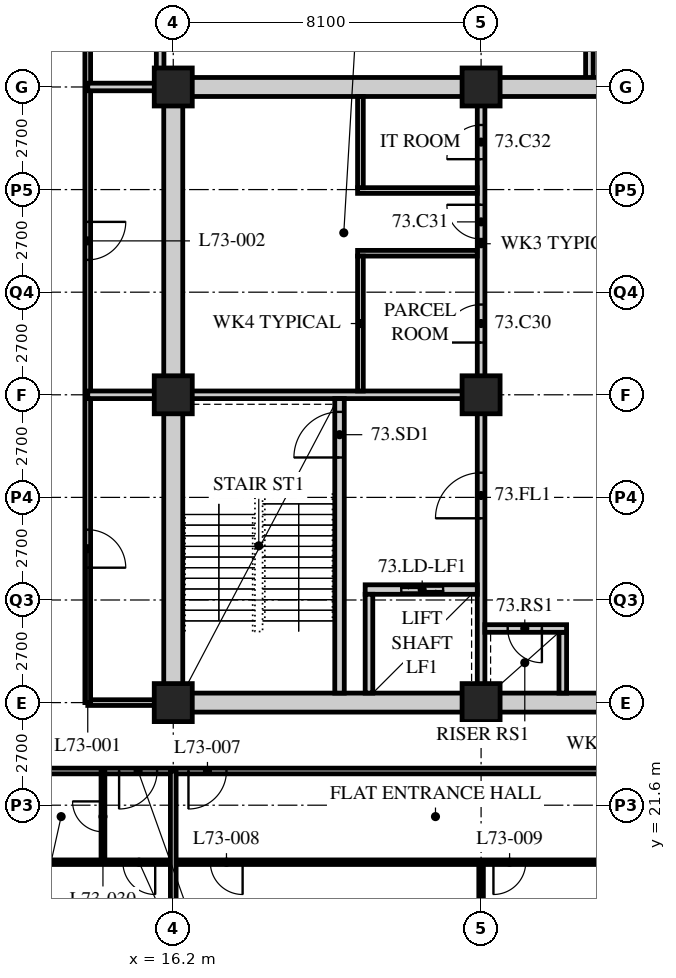
"""IFC4 building model, lengths in metres.
Left out: names, types, materials, properties, quantities, classifications, styles, units other than length and angle.
Written with IfcOpenShell. Run it as: python <this file> out.ifc"""

import sys

from ifc_helpers import new_model, si_unit, direction, frame, frame_2d, origin, origin_2d, place, context, subcontext, project, spatial, rectangle, hollow_rectangle, extrude, element, fill, save


model = new_model("IFC4")
c1 = context("Model", 3, precision=1e-05, world=origin(), true_north=direction((0.0, 1.0)))
c2 = subcontext(c1, "Body", "Model", "MODEL_VIEW")
j1 = project(units=[si_unit("LENGTHUNIT", "METRE"), si_unit("PLANEANGLEUNIT", "RADIAN")], contexts=[c1])
p1 = place(None, origin())
s1 = spatial("IfcSite", under=j1, at=p1, CompositionType="ELEMENT")
p2 = place(p1, origin())
s2 = spatial("IfcBuilding", under=s1, at=p2, CompositionType="ELEMENT")
p3 = place(p2, frame((0.0, 0.0, 285.3)))
s3 = spatial("IfcBuildingStorey", under=s2, at=p3, CompositionType="ELEMENT", Elevation=285.3)
for number, where, z_axis, x_axis in (
    (1, (16.2, 24.3, 0.0), (0.0, 0.0, 1.0), (1.0, 0.0, 0.0)),
    (2, (16.2, 32.4, 0.0), (0.0, 0.0, 1.0), (1.0, 0.0, 0.0)),
    (3, (16.2, 40.5, 0.0), (0.0, 0.0, 1.0), (1.0, 0.0, 0.0)),
    (4, (24.3, 24.3, 0.0), (0.0, 0.0, 1.0), (1.0, 0.0, 0.0)),
    (5, (24.3, 32.4, 0.0), (0.0, 0.0, 1.0), (1.0, 0.0, 0.0)),
    (6, (24.3, 40.5, 0.0), (0.0, 0.0, 1.0), (1.0, 0.0, 0.0)),
):
    element("IfcColumn", number, at=place(p3, frame(where, z_axis=z_axis, x_axis=x_axis)), inside=s3, PredefinedType="COLUMN", context=c2, shape_type="SweptSolid", body=[
        extrude(hollow_rectangle(XDim=1.0, YDim=1.0, WallThickness=0.1, at=origin_2d()), origin(), (0.0, 0.0, 1.0), 3.9),
    ])
p4 = place(p3, frame((12.15, 22.5, 0.0), z_axis=(0.0, 0.0, 1.0), x_axis=(1.0, 0.0, 0.0)))
e7 = element("IfcWall", 7, at=p4, inside=s3, PredefinedType="PARTITIONING", context=c2, shape_type="SweptSolid", body=[
    extrude(rectangle(XDim=24.3, YDim=0.15, at=frame_2d((12.15, 0.0))), origin(), (0.0, 0.0, 1.0), 3.69),
])
p5 = place(p4, frame((4.45, 0.0, 0.0)))
e8 = element("IfcOpeningElement", 8, at=p5, cuts=e7, PredefinedType="OPENING", context=c2, shape_type="SweptSolid", body=[
    extrude(rectangle(XDim=1.0, YDim=2.1, at=frame_2d((0.5, 1.05))), frame((0.0, 0.085, 0.0), z_axis=(0.0, -1.0, 0.0), x_axis=(1.0, 0.0, 0.0)), (0.0, 0.0, 1.0), 0.17),
])
p6 = place(p4, frame((22.6, 0.0, 0.0)))
e9 = element("IfcOpeningElement", 9, at=p6, cuts=e7, PredefinedType="OPENING", context=c2, shape_type="SweptSolid", body=[
    extrude(rectangle(XDim=1.0, YDim=2.1, at=frame_2d((0.5, 1.05))), frame((0.0, 0.085, 0.0), z_axis=(0.0, -1.0, 0.0), x_axis=(1.0, 0.0, 0.0)), (0.0, 0.0, 1.0), 0.17),
])
p7 = place(p4, frame((2.625, 0.0, 0.0)))
e10 = element("IfcOpeningElement", 10, at=p7, cuts=e7, PredefinedType="OPENING", context=c2, shape_type="SweptSolid", body=[
    extrude(rectangle(XDim=1.0, YDim=2.1, at=frame_2d((0.5, 1.05))), frame((0.0, 0.085, 0.0), z_axis=(0.0, -1.0, 0.0), x_axis=(1.0, 0.0, 0.0)), (0.0, 0.0, 1.0), 0.17),
])
p8 = place(p3, frame((16.0, 24.3, 0.0), z_axis=(0.0, 0.0, 1.0), x_axis=(-1.0, 0.0, 0.0)))
e11 = element("IfcWall", 11, at=p8, inside=s3, PredefinedType="PARTITIONING", context=c2, shape_type="SweptSolid", body=[
    extrude(rectangle(XDim=2.05, YDim=0.15, at=frame_2d((1.025, 0.0))), origin(), (0.0, 0.0, 1.0), 3.078),
])
p9 = place(p3, frame((13.95, 24.3, 0.0), z_axis=(0.0, 0.0, 1.0), x_axis=(0.0, 1.0, 0.0)))
e12 = element("IfcWall", 12, at=p9, inside=s3, PredefinedType="PARTITIONING", context=c2, shape_type="SweptSolid", body=[
    extrude(rectangle(XDim=22.5, YDim=0.15, at=frame_2d((11.25, 0.0))), origin(), (0.0, 0.0, 1.0), 3.69),
])
p10 = place(p9, frame((3.55, 0.0, 0.0)))
e13 = element("IfcOpeningElement", 13, at=p10, cuts=e12, PredefinedType="OPENING", context=c2, shape_type="SweptSolid", body=[
    extrude(rectangle(XDim=1.0, YDim=2.1, at=frame_2d((0.5, 1.05))), frame((0.0, 0.085, 0.0), z_axis=(0.0, -1.0, 0.0), x_axis=(1.0, 0.0, 0.0)), (0.0, 0.0, 1.0), 0.17),
])
p11 = place(p9, frame((11.65, 0.0, 0.0)))
e14 = element("IfcOpeningElement", 14, at=p11, cuts=e12, PredefinedType="OPENING", context=c2, shape_type="SweptSolid", body=[
    extrude(rectangle(XDim=1.0, YDim=2.1, at=frame_2d((0.5, 1.05))), frame((0.0, 0.085, 0.0), z_axis=(0.0, -1.0, 0.0), x_axis=(1.0, 0.0, 0.0)), (0.0, 0.0, 1.0), 0.17),
])
p12 = place(p3, frame((13.95, 32.4, 0.0), z_axis=(0.0, 0.0, 1.0), x_axis=(1.0, 0.0, 0.0)))
e15 = element("IfcWall", 15, at=p12, inside=s3, PredefinedType="SOLIDWALL", context=c2, shape_type="SweptSolid", body=[
    extrude(rectangle(XDim=2.25, YDim=0.2, at=frame_2d((1.125, 0.0))), origin(), (0.0, 0.0, 1.0), 3.078),
])
for number, where, z_axis, x_axis in (
    (16, (15.855, 46.8, 0.0), (0.0, 0.0, 1.0), (0.0, -1.0, 0.0)),
    (17, (27.15, 40.5, 0.0), (0.0, 0.0, 1.0), (0.0, 1.0, 0.0)),
):
    element("IfcWall", number, at=place(p3, frame(where, z_axis=z_axis, x_axis=x_axis)), inside=s3, PredefinedType="SOLIDWALL", context=c2, shape_type="SweptSolid", body=[
        extrude(rectangle(XDim=6.3, YDim=0.2, at=frame_2d((3.15, 0.0))), origin(), (0.0, 0.0, 1.0), 3.69),
    ])
p13 = place(p3, frame((13.95, 40.5, 0.0), z_axis=(0.0, 0.0, 1.0), x_axis=(1.0, 0.0, 0.0)))
e18 = element("IfcWall", 18, at=p13, inside=s3, PredefinedType="SOLIDWALL", context=c2, shape_type="SweptSolid", body=[
    extrude(rectangle(XDim=2.25, YDim=0.2, at=frame_2d((1.125, 0.0))), origin(), (0.0, 0.0, 1.0), 3.078),
])
p14 = place(p3, frame((24.3, 20.1, 0.0), z_axis=(0.0, 0.0, 1.0), x_axis=(0.0, -1.0, 0.0)))
e19 = element("IfcWall", 19, at=p14, inside=s3, PredefinedType="PARTITIONING", context=c2, shape_type="SweptSolid", body=[
    extrude(rectangle(XDim=3.6, YDim=0.12, at=frame_2d((1.8, 0.0))), origin(), (0.0, 0.0, 1.0), 3.078),
])
p15 = place(p3, frame((12.15, 20.1, 0.0), z_axis=(0.0, 0.0, 1.0), x_axis=(1.0, 0.0, 0.0)))
e20 = element("IfcWall", 20, at=p15, inside=s3, PredefinedType="PARTITIONING", context=c2, shape_type="SweptSolid", body=[
    extrude(rectangle(XDim=20.25, YDim=0.12, at=frame_2d((10.125, 0.0))), origin(), (0.0, 0.0, 1.0), 3.69),
])
p16 = place(p15, frame((5.025, 0.0, 0.0)))
e21 = element("IfcOpeningElement", 21, at=p16, cuts=e20, PredefinedType="OPENING", context=c2, shape_type="SweptSolid", body=[
    extrude(rectangle(XDim=0.85, YDim=2.1, at=frame_2d((0.425, 1.05))), frame((0.0, 0.07, 0.0), z_axis=(0.0, -1.0, 0.0), x_axis=(1.0, 0.0, 0.0)), (0.0, 0.0, 1.0), 0.14),
])
p17 = place(p15, frame((12.475, 0.0, 0.0)))
e22 = element("IfcOpeningElement", 22, at=p17, cuts=e20, PredefinedType="OPENING", context=c2, shape_type="SweptSolid", body=[
    extrude(rectangle(XDim=0.85, YDim=2.1, at=frame_2d((0.425, 1.05))), frame((0.0, 0.07, 0.0), z_axis=(0.0, -1.0, 0.0), x_axis=(1.0, 0.0, 0.0)), (0.0, 0.0, 1.0), 0.14),
])
p18 = place(p15, frame((16.525, 0.0, 0.0)))
e23 = element("IfcOpeningElement", 23, at=p18, cuts=e20, PredefinedType="OPENING", context=c2, shape_type="SweptSolid", body=[
    extrude(rectangle(XDim=0.85, YDim=2.1, at=frame_2d((0.425, 1.05))), frame((0.0, 0.07, 0.0), z_axis=(0.0, -1.0, 0.0), x_axis=(1.0, 0.0, 0.0)), (0.0, 0.0, 1.0), 0.14),
])
p19 = place(p15, frame((2.725, 0.0, 0.0)))
e24 = element("IfcOpeningElement", 24, at=p19, cuts=e20, PredefinedType="OPENING", context=c2, shape_type="SweptSolid", body=[
    extrude(rectangle(XDim=0.85, YDim=2.1, at=frame_2d((0.425, 1.05))), frame((0.0, 0.07, 0.0), z_axis=(0.0, -1.0, 0.0), x_axis=(1.0, 0.0, 0.0)), (0.0, 0.0, 1.0), 0.14),
])
p20 = place(p3, frame((14.35, 22.5, 0.0), z_axis=(0.0, 0.0, 1.0), x_axis=(0.0, -1.0, 0.0)))
e25 = element("IfcWall", 25, at=p20, inside=s3, PredefinedType="PARTITIONING", context=c2, shape_type="SweptSolid", body=[
    extrude(rectangle(XDim=2.4, YDim=0.1, at=frame_2d((1.2, 0.0))), origin(), (0.0, 0.0, 1.0), 3.69),
])
p21 = place(p20, frame((0.8, 0.0, 0.0)))
e26 = element("IfcOpeningElement", 26, at=p21, cuts=e25, PredefinedType="OPENING", context=c2, shape_type="SweptSolid", body=[
    extrude(rectangle(XDim=0.8, YDim=2.1, at=frame_2d((0.4, 1.05))), frame((0.0, 0.06, 0.0), z_axis=(0.0, -1.0, 0.0), x_axis=(1.0, 0.0, 0.0)), (0.0, 0.0, 1.0), 0.12),
])
p22 = place(p3, frame((16.2, 22.5, 0.0), z_axis=(0.0, 0.0, 1.0), x_axis=(0.0, -1.0, 0.0)))
e27 = element("IfcWall", 27, at=p22, inside=s3, PredefinedType="PARTITIONING", context=c2, shape_type="SweptSolid", body=[
    extrude(rectangle(XDim=6.0, YDim=0.15, at=frame_2d((3.0, 0.0))), origin(), (0.0, 0.0, 1.0), 3.078),
])
p23 = place(p3, frame((15.95, 24.3, 0.0), z_axis=(0.0, 0.0, 1.0), x_axis=(1.0, 0.0, 0.0)))
e28 = element("IfcWall", 28, at=p23, inside=s3, PredefinedType="SOLIDWALL", context=c2, shape_type="SweptSolid", body=[
    extrude(rectangle(XDim=24.55, YDim=0.5, at=frame_2d((12.275, 0.0))), origin(), (0.0, 0.0, 1.0), 3.04),
])
p24 = place(p23, frame((11.5, 0.0, 0.0)))
e29 = element("IfcOpeningElement", 29, at=p24, cuts=e28, PredefinedType="OPENING", context=c2, shape_type="SweptSolid", body=[
    extrude(rectangle(XDim=1.8, YDim=2.4, at=frame_2d((0.9, 1.2))), frame((0.0, 0.26, 0.0), z_axis=(0.0, -1.0, 0.0), x_axis=(1.0, 0.0, 0.0)), (0.0, 0.0, 1.0), 0.52),
])
p25 = place(p3, frame((15.95, 40.5, 0.0), z_axis=(0.0, 0.0, 1.0), x_axis=(1.0, 0.0, 0.0)))
e30 = element("IfcWall", 30, at=p25, inside=s3, PredefinedType="SOLIDWALL", context=c2, shape_type="SweptSolid", body=[
    extrude(rectangle(XDim=24.55, YDim=0.5, at=frame_2d((12.275, 0.0))), origin(), (0.0, 0.0, 1.0), 3.04),
])
p26 = place(p25, frame((11.5, 0.0, 0.0)))
e31 = element("IfcOpeningElement", 31, at=p26, cuts=e30, PredefinedType="OPENING", context=c2, shape_type="SweptSolid", body=[
    extrude(rectangle(XDim=1.8, YDim=2.4, at=frame_2d((0.9, 1.2))), frame((0.0, 0.26, 0.0), z_axis=(0.0, -1.0, 0.0), x_axis=(1.0, 0.0, 0.0)), (0.0, 0.0, 1.0), 0.52),
])
p27 = place(p3, frame((16.2, 24.55, 0.0), z_axis=(0.0, 0.0, 1.0), x_axis=(0.0, 1.0, 0.0)))
e32 = element("IfcWall", 32, at=p27, inside=s3, PredefinedType="SOLIDWALL", context=c2, shape_type="SweptSolid", body=[
    extrude(rectangle(XDim=15.7, YDim=0.5, at=frame_2d((7.85, 0.0))), origin(), (0.0, 0.0, 1.0), 3.078),
])
p28 = place(p3, frame((16.45, 32.4, 0.0), z_axis=(0.0, 0.0, 1.0), x_axis=(1.0, 0.0, 0.0)))
e33 = element("IfcWall", 33, at=p28, inside=s3, PredefinedType="SOLIDWALL", context=c2, shape_type="SweptSolid", body=[
    extrude(rectangle(XDim=7.95, YDim=0.2, at=frame_2d((3.975, 0.0))), origin(), (0.0, 0.0, 1.0), 3.078),
])
p29 = place(p3, frame((24.3, 24.55, 0.0), z_axis=(0.0, 0.0, 1.0), x_axis=(0.0, 1.0, 0.0)))
e34 = element("IfcWall", 34, at=p29, inside=s3, PredefinedType="SOLIDWALL", context=c2, shape_type="SweptSolid", body=[
    extrude(rectangle(XDim=7.75, YDim=0.2, at=frame_2d((3.875, 0.0))), origin(), (0.0, 0.0, 1.0), 3.078),
])
p30 = place(p29, frame((4.6, 0.0, 0.0)))
e35 = element("IfcOpeningElement", 35, at=p30, cuts=e34, PredefinedType="OPENING", context=c2, shape_type="SweptSolid", body=[
    extrude(rectangle(XDim=1.2, YDim=2.1, at=frame_2d((0.6, 1.05))), frame((0.0, 0.11, 0.0), z_axis=(0.0, -1.0, 0.0), x_axis=(1.0, 0.0, 0.0)), (0.0, 0.0, 1.0), 0.22),
])
p31 = place(p3, frame((20.575, 24.55, 0.0), z_axis=(0.0, 0.0, 1.0), x_axis=(0.0, 1.0, 0.0)))
e36 = element("IfcWall", 36, at=p31, inside=s3, PredefinedType="SOLIDWALL", context=c2, shape_type="SweptSolid", body=[
    extrude(rectangle(XDim=7.75, YDim=0.25, at=frame_2d((3.875, 0.0))), origin(), (0.0, 0.0, 1.0), 3.69),
])
p32 = place(p31, frame((6.2, 0.0, 0.0)))
e37 = element("IfcOpeningElement", 37, at=p32, cuts=e36, PredefinedType="OPENING", context=c2, shape_type="SweptSolid", body=[
    extrude(rectangle(XDim=1.2, YDim=2.1, at=frame_2d((0.6, 1.05))), frame((0.0, 0.135, 0.0), z_axis=(0.0, -1.0, 0.0), x_axis=(1.0, 0.0, 0.0)), (0.0, 0.0, 1.0), 0.27),
])
p33 = place(p3, frame((21.25, 27.275, 0.0), z_axis=(0.0, 0.0, 1.0), x_axis=(1.0, 0.0, 0.0)))
e38 = element("IfcWall", 38, at=p33, inside=s3, PredefinedType="SOLIDWALL", context=c2, shape_type="SweptSolid", body=[
    extrude(rectangle(XDim=2.95, YDim=0.25, at=frame_2d((1.475, 0.0))), origin(), (0.0, 0.0, 1.0), 3.69),
])
p34 = place(p33, frame((0.95, 0.0, 0.0)))
e39 = element("IfcOpeningElement", 39, at=p34, cuts=e38, PredefinedType="OPENING", context=c2, shape_type="SweptSolid", body=[
    extrude(rectangle(XDim=1.1, YDim=2.4, at=frame_2d((0.55, 1.2))), frame((0.0, 0.135, 0.0), z_axis=(0.0, -1.0, 0.0), x_axis=(1.0, 0.0, 0.0)), (0.0, 0.0, 1.0), 0.27),
])
p35 = place(p3, frame((21.35, 24.55, 0.0), z_axis=(0.0, 0.0, 1.0), x_axis=(0.0, 1.0, 0.0)))
e40 = element("IfcWall", 40, at=p35, inside=s3, PredefinedType="SOLIDWALL", context=c2, shape_type="SweptSolid", body=[
    extrude(rectangle(XDim=2.6, YDim=0.2, at=frame_2d((1.3, 0.0))), origin(), (0.0, 0.0, 1.0), 3.69),
])
p36 = place(p3, frame((26.45, 24.55, 0.0), z_axis=(0.0, 0.0, 1.0), x_axis=(0.0, 1.0, 0.0)))
e41 = element("IfcWall", 41, at=p36, inside=s3, PredefinedType="SOLIDWALL", context=c2, shape_type="SweptSolid", body=[
    extrude(rectangle(XDim=1.6, YDim=0.2, at=frame_2d((0.8, 0.0))), origin(), (0.0, 0.0, 1.0), 3.69),
])
p37 = place(p3, frame((24.4, 26.25, 0.0), z_axis=(0.0, 0.0, 1.0), x_axis=(1.0, 0.0, 0.0)))
e42 = element("IfcWall", 42, at=p37, inside=s3, PredefinedType="SOLIDWALL", context=c2, shape_type="SweptSolid", body=[
    extrude(rectangle(XDim=2.15, YDim=0.2, at=frame_2d((1.075, 0.0))), origin(), (0.0, 0.0, 1.0), 3.69),
])
p38 = place(p37, frame((0.6, 0.0, 0.0)))
e43 = element("IfcOpeningElement", 43, at=p38, cuts=e42, PredefinedType="OPENING", context=c2, shape_type="SweptSolid", body=[
    extrude(rectangle(XDim=0.9, YDim=2.1, at=frame_2d((0.45, 1.05))), frame((0.0, 0.11, 0.0), z_axis=(0.0, -1.0, 0.0), x_axis=(1.0, 0.0, 0.0)), (0.0, 0.0, 1.0), 0.22),
])
p39 = place(p3, frame((24.3, 32.5, 0.0), z_axis=(0.0, 0.0, 1.0), x_axis=(0.0, 1.0, 0.0)))
e44 = element("IfcWall", 44, at=p39, inside=s3, PredefinedType="PARTITIONING", context=c2, shape_type="SweptSolid", body=[
    extrude(rectangle(XDim=7.75, YDim=0.2, at=frame_2d((3.875, 0.0))), origin(), (0.0, 0.0, 1.0), 3.078),
])
p40 = place(p39, frame((1.275, 0.0, 0.0)))
e45 = element("IfcOpeningElement", 45, at=p40, cuts=e44, PredefinedType="OPENING", context=c2, shape_type="SweptSolid", body=[
    extrude(rectangle(XDim=1.0, YDim=2.1, at=frame_2d((0.5, 1.05))), frame((0.0, 0.11, 0.0), z_axis=(0.0, -1.0, 0.0), x_axis=(1.0, 0.0, 0.0)), (0.0, 0.0, 1.0), 0.22),
])
p41 = place(p39, frame((4.0, 0.0, 0.0)))
e46 = element("IfcOpeningElement", 46, at=p41, cuts=e44, PredefinedType="OPENING", context=c2, shape_type="SweptSolid", body=[
    extrude(rectangle(XDim=0.9, YDim=2.1, at=frame_2d((0.45, 1.05))), frame((0.0, 0.11, 0.0), z_axis=(0.0, -1.0, 0.0), x_axis=(1.0, 0.0, 0.0)), (0.0, 0.0, 1.0), 0.22),
])
p42 = place(p39, frame((6.1, 0.0, 0.0)))
e47 = element("IfcOpeningElement", 47, at=p42, cuts=e44, PredefinedType="OPENING", context=c2, shape_type="SweptSolid", body=[
    extrude(rectangle(XDim=0.9, YDim=2.1, at=frame_2d((0.45, 1.05))), frame((0.0, 0.11, 0.0), z_axis=(0.0, -1.0, 0.0), x_axis=(1.0, 0.0, 0.0)), (0.0, 0.0, 1.0), 0.22),
])
for number, where, z_axis, x_axis in (
    (48, (21.05, 36.125, 0.0), (0.0, 0.0, 1.0), (1.0, 0.0, 0.0)),
    (49, (21.05, 37.775, 0.0), (0.0, 0.0, 1.0), (1.0, 0.0, 0.0)),
):
    element("IfcWall", number, at=place(p3, frame(where, z_axis=z_axis, x_axis=x_axis)), inside=s3, PredefinedType="PARTITIONING", context=c2, shape_type="SweptSolid", body=[
        extrude(rectangle(XDim=3.15, YDim=0.15, at=frame_2d((1.575, 0.0))), origin(), (0.0, 0.0, 1.0), 3.69),
    ])
p43 = place(p3, frame((21.125, 32.5, 0.0), z_axis=(0.0, 0.0, 1.0), x_axis=(0.0, 1.0, 0.0)))
e50 = element("IfcWall", 50, at=p43, inside=s3, PredefinedType="PARTITIONING", context=c2, shape_type="SweptSolid", body=[
    extrude(rectangle(XDim=3.55, YDim=0.15, at=frame_2d((1.775, 0.0))), origin(), (0.0, 0.0, 1.0), 3.69),
])
p44 = place(p3, frame((21.125, 37.85, 0.0), z_axis=(0.0, 0.0, 1.0), x_axis=(0.0, 1.0, 0.0)))
e51 = element("IfcWall", 51, at=p44, inside=s3, PredefinedType="PARTITIONING", context=c2, shape_type="SweptSolid", body=[
    extrude(rectangle(XDim=2.4, YDim=0.15, at=frame_2d((1.2, 0.0))), origin(), (0.0, 0.0, 1.0), 3.69),
])
p45 = place(p10, origin())
e52 = element("IfcDoor", 52, at=p45, inside=s3, OperationType="SINGLE_SWING_RIGHT", PredefinedType="DOOR", context=c2, shape_type="SweptSolid", body=[
    extrude(rectangle(XDim=1.0, YDim=2.1, at=frame_2d((0.5, 1.05))), frame((0.0, 0.025, 0.0), z_axis=(0.0, -1.0, 0.0), x_axis=(1.0, 0.0, 0.0)), (0.0, 0.0, 1.0), 0.05),
])
fill(e13, e52)
p46 = place(p11, origin())
e53 = element("IfcDoor", 53, at=p46, inside=s3, OperationType="SINGLE_SWING_LEFT", PredefinedType="DOOR", context=c2, shape_type="SweptSolid", body=[
    extrude(rectangle(XDim=1.0, YDim=2.1, at=frame_2d((0.5, 1.05))), frame((0.0, 0.025, 0.0), z_axis=(0.0, -1.0, 0.0), x_axis=(1.0, 0.0, 0.0)), (0.0, 0.0, 1.0), 0.05),
])
fill(e14, e53)
p47 = place(p5, origin())
e54 = element("IfcDoor", 54, at=p47, inside=s3, OperationType="SINGLE_SWING_RIGHT", PredefinedType="DOOR", context=c2, shape_type="SweptSolid", body=[
    extrude(rectangle(XDim=1.0, YDim=2.1, at=frame_2d((0.5, 1.05))), frame((0.0, 0.025, 0.0), z_axis=(0.0, -1.0, 0.0), x_axis=(1.0, 0.0, 0.0)), (0.0, 0.0, 1.0), 0.05),
])
fill(e8, e54)
p48 = place(p16, origin())
e55 = element("IfcDoor", 55, at=p48, inside=s3, OperationType="SINGLE_SWING_LEFT", PredefinedType="DOOR", context=c2, shape_type="SweptSolid", body=[
    extrude(rectangle(XDim=0.85, YDim=2.1, at=frame_2d((0.425, 1.05))), frame((0.0, 0.025, 0.0), z_axis=(0.0, -1.0, 0.0), x_axis=(1.0, 0.0, 0.0)), (0.0, 0.0, 1.0), 0.05),
])
fill(e21, e55)
p49 = place(p17, origin())
e56 = element("IfcDoor", 56, at=p49, inside=s3, OperationType="SINGLE_SWING_RIGHT", PredefinedType="DOOR", context=c2, shape_type="SweptSolid", body=[
    extrude(rectangle(XDim=0.85, YDim=2.1, at=frame_2d((0.425, 1.05))), frame((0.0, 0.025, 0.0), z_axis=(0.0, -1.0, 0.0), x_axis=(1.0, 0.0, 0.0)), (0.0, 0.0, 1.0), 0.05),
])
fill(e22, e56)
p50 = place(p21, origin())
e57 = element("IfcDoor", 57, at=p50, inside=s3, OperationType="SINGLE_SWING_RIGHT", PredefinedType="DOOR", context=c2, shape_type="SweptSolid", body=[
    extrude(rectangle(XDim=0.8, YDim=2.1, at=frame_2d((0.4, 1.05))), frame((0.0, 0.025, 0.0), z_axis=(0.0, -1.0, 0.0), x_axis=(1.0, 0.0, 0.0)), (0.0, 0.0, 1.0), 0.05),
])
fill(e26, e57)
p51 = place(p7, origin())
e58 = element("IfcDoor", 58, at=p51, inside=s3, OperationType="SINGLE_SWING_RIGHT", PredefinedType="DOOR", context=c2, shape_type="SweptSolid", body=[
    extrude(rectangle(XDim=1.0, YDim=2.1, at=frame_2d((0.5, 1.05))), frame((0.0, 0.025, 0.0), z_axis=(0.0, -1.0, 0.0), x_axis=(1.0, 0.0, 0.0)), (0.0, 0.0, 1.0), 0.05),
])
fill(e10, e58)
p52 = place(p19, origin())
e59 = element("IfcDoor", 59, at=p52, inside=s3, OperationType="SINGLE_SWING_LEFT", PredefinedType="DOOR", context=c2, shape_type="SweptSolid", body=[
    extrude(rectangle(XDim=0.85, YDim=2.1, at=frame_2d((0.425, 1.05))), frame((0.0, 0.025, 0.0), z_axis=(0.0, -1.0, 0.0), x_axis=(1.0, 0.0, 0.0)), (0.0, 0.0, 1.0), 0.05),
])
fill(e24, e59)
p53 = place(p40, origin())
e60 = element("IfcDoor", 60, at=p53, inside=s3, OperationType="SINGLE_SWING_LEFT", PredefinedType="DOOR", context=c2, shape_type="SweptSolid", body=[
    extrude(rectangle(XDim=1.0, YDim=2.1, at=frame_2d((0.5, 1.05))), frame((0.0, 0.025, 0.0), z_axis=(0.0, -1.0, 0.0), x_axis=(1.0, 0.0, 0.0)), (0.0, 0.0, 1.0), 0.05),
])
fill(e45, e60)
p54 = place(p41, origin())
e61 = element("IfcDoor", 61, at=p54, inside=s3, OperationType="SINGLE_SWING_RIGHT", PredefinedType="DOOR", context=c2, shape_type="SweptSolid", body=[
    extrude(rectangle(XDim=0.9, YDim=2.1, at=frame_2d((0.45, 1.05))), frame((0.0, 0.025, 0.0), z_axis=(0.0, -1.0, 0.0), x_axis=(1.0, 0.0, 0.0)), (0.0, 0.0, 1.0), 0.05),
])
fill(e46, e61)
p55 = place(p42, origin())
e62 = element("IfcDoor", 62, at=p55, inside=s3, OperationType="SINGLE_SWING_LEFT", PredefinedType="DOOR", context=c2, shape_type="SweptSolid", body=[
    extrude(rectangle(XDim=0.9, YDim=2.1, at=frame_2d((0.45, 1.05))), frame((0.0, 0.025, 0.0), z_axis=(0.0, -1.0, 0.0), x_axis=(1.0, 0.0, 0.0)), (0.0, 0.0, 1.0), 0.05),
])
fill(e47, e62)
p56 = place(p32, origin())
e63 = element("IfcDoor", 63, at=p56, inside=s3, OperationType="SINGLE_SWING_LEFT", PredefinedType="DOOR", context=c2, shape_type="SweptSolid", body=[
    extrude(rectangle(XDim=1.2, YDim=2.1, at=frame_2d((0.6, 1.05))), frame((0.0, 0.025, 0.0), z_axis=(0.0, -1.0, 0.0), x_axis=(1.0, 0.0, 0.0)), (0.0, 0.0, 1.0), 0.05),
])
fill(e37, e63)
p57 = place(p30, origin())
e64 = element("IfcDoor", 64, at=p57, inside=s3, OperationType="SINGLE_SWING_LEFT", PredefinedType="DOOR", context=c2, shape_type="SweptSolid", body=[
    extrude(rectangle(XDim=1.2, YDim=2.1, at=frame_2d((0.6, 1.05))), frame((0.0, 0.025, 0.0), z_axis=(0.0, -1.0, 0.0), x_axis=(1.0, 0.0, 0.0)), (0.0, 0.0, 1.0), 0.05),
])
fill(e35, e64)
p58 = place(p38, origin())
e65 = element("IfcDoor", 65, at=p58, inside=s3, OperationType="SINGLE_SWING_LEFT", PredefinedType="DOOR", context=c2, shape_type="SweptSolid", body=[
    extrude(rectangle(XDim=0.9, YDim=2.1, at=frame_2d((0.45, 1.05))), frame((0.0, 0.025, 0.0), z_axis=(0.0, -1.0, 0.0), x_axis=(1.0, 0.0, 0.0)), (0.0, 0.0, 1.0), 0.05),
])
fill(e43, e65)
p59 = place(p34, origin())
e66 = element("IfcDoor", 66, at=p59, inside=s3, OperationType="DOUBLE_DOOR_SLIDING", PredefinedType="DOOR", context=c2, shape_type="SweptSolid", body=[
    extrude(rectangle(XDim=1.1, YDim=2.4, at=frame_2d((0.55, 1.2))), frame((0.0, 0.025, 0.0), z_axis=(0.0, -1.0, 0.0), x_axis=(1.0, 0.0, 0.0)), (0.0, 0.0, 1.0), 0.05),
])
fill(e39, e66)
save(model, sys.argv[1])
